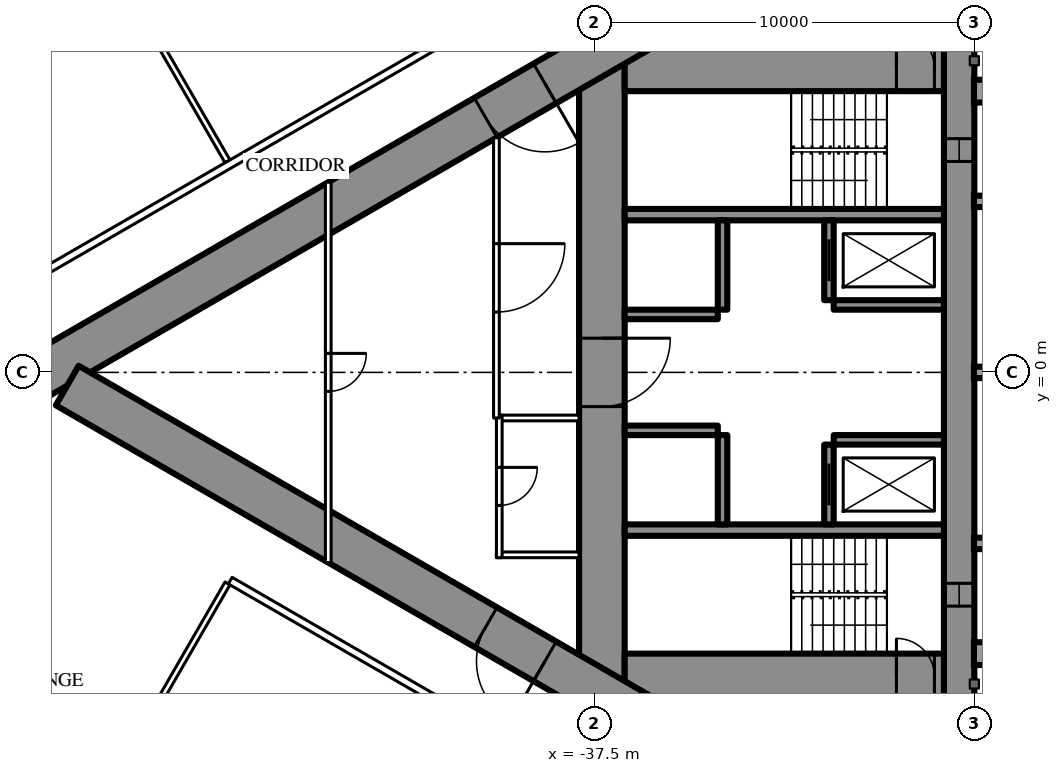
"""IFC4 building model, lengths in metres.
Left out: names, types, materials, properties, quantities, classifications, styles, units other than length and angle.
Written with IfcOpenShell. Run it as: python <this file> out.ifc"""

import sys

from ifc_helpers import new_model, si_unit, direction, frame, frame_2d, origin, place, context, subcontext, project, spatial, rectangle, extrude, element, fill, save


model = new_model("IFC4")
c1 = context("Model", 3, precision=1e-05, world=origin(), true_north=direction((0.0, 1.0)))
c2 = subcontext(c1, "Body", "Model", "MODEL_VIEW")
j1 = project(units=[si_unit("LENGTHUNIT", "METRE"), si_unit("PLANEANGLEUNIT", "RADIAN")], contexts=[c1])
p1 = place(None, origin())
s1 = spatial("IfcSite", under=j1, at=p1, CompositionType="ELEMENT")
p2 = place(p1, origin())
s2 = spatial("IfcBuilding", under=s1, at=p2, CompositionType="ELEMENT")
p3 = place(p2, frame((0.0, 0.0, 136.1)))
s3 = spatial("IfcBuildingStorey", under=s2, at=p3, CompositionType="ELEMENT", Elevation=136.1)
p4 = place(p3, frame((-27.9, 8.6, 0.0), z_axis=(0.0, 0.0, 1.0), x_axis=(0.0, -1.0, 0.0)))
e1 = element("IfcWall", 1, at=p4, inside=s3, PredefinedType="SHEAR", context=c2, shape_type="SweptSolid", body=[
    extrude(rectangle(XDim=17.2, YDim=0.8, at=frame_2d((8.6, 0.0))), origin(), (0.0, 0.0, 1.0), 3.5),
])
p5 = place(p4, frame((2.45, 0.0, 0.6)))
e2 = element("IfcOpeningElement", 2, at=p5, cuts=e1, PredefinedType="OPENING", context=c2, shape_type="SweptSolid", body=[
    extrude(rectangle(XDim=0.6, YDim=2.1, at=frame_2d((0.3, 1.05))), frame((0.0, 0.41, 0.0), z_axis=(0.0, -1.0, 0.0), x_axis=(1.0, 0.0, 0.0)), (0.0, 0.0, 1.0), 0.82),
])
p6 = place(p4, frame((14.15, 0.0, 0.6)))
e3 = element("IfcOpeningElement", 3, at=p6, cuts=e1, PredefinedType="OPENING", context=c2, shape_type="SweptSolid", body=[
    extrude(rectangle(XDim=0.6, YDim=2.1, at=frame_2d((0.3, 1.05))), frame((0.0, 0.41, 0.0), z_axis=(0.0, -1.0, 0.0), x_axis=(1.0, 0.0, 0.0)), (0.0, 0.0, 1.0), 0.82),
])
p7 = place(p3, frame((-37.3, 8.6, 0.0), z_axis=(0.0, 0.0, 1.0), x_axis=(0.0, -1.0, 0.0)))
e4 = element("IfcWall", 4, at=p7, inside=s3, PredefinedType="SHEAR", context=c2, shape_type="SweptSolid", body=[
    extrude(rectangle(XDim=17.2, YDim=1.2, at=frame_2d((8.6, 0.0))), origin(), (0.0, 0.0, 1.0), 3.5),
])
p8 = place(p7, frame((7.7, 0.0, 0.0)))
e5 = element("IfcOpeningElement", 5, at=p8, cuts=e4, PredefinedType="OPENING", context=c2, shape_type="SweptSolid", body=[
    extrude(rectangle(XDim=1.8, YDim=2.2, at=frame_2d((0.9, 1.1))), frame((0.0, 0.61, 0.0), z_axis=(0.0, -1.0, 0.0), x_axis=(1.0, 0.0, 0.0)), (0.0, 0.0, 1.0), 1.22),
])
p9 = place(p3, frame((-28.3, 8.0, 0.0), z_axis=(0.0, 0.0, 1.0), x_axis=(-1.0, 0.0, 0.0)))
e6 = element("IfcWall", 6, at=p9, inside=s3, PredefinedType="SHEAR", context=c2, shape_type="SweptSolid", body=[
    extrude(rectangle(XDim=8.4, YDim=1.2, at=frame_2d((4.2, 0.0))), origin(), (0.0, 0.0, 1.0), 3.5),
])
p10 = place(p9, frame((0.25, 0.0, 0.0)))
e7 = element("IfcOpeningElement", 7, at=p10, cuts=e6, PredefinedType="OPENING", context=c2, shape_type="SweptSolid", body=[
    extrude(rectangle(XDim=1.0, YDim=2.2, at=frame_2d((0.5, 1.1))), frame((0.0, 0.61, 0.0), z_axis=(0.0, -1.0, 0.0), x_axis=(1.0, 0.0, 0.0)), (0.0, 0.0, 1.0), 1.22),
])
p11 = place(p3, frame((-28.3, -8.0, 0.0), z_axis=(0.0, 0.0, 1.0), x_axis=(-1.0, 0.0, 0.0)))
e8 = element("IfcWall", 8, at=p11, inside=s3, PredefinedType="SHEAR", context=c2, shape_type="SweptSolid", body=[
    extrude(rectangle(XDim=8.4, YDim=1.2, at=frame_2d((4.2, 0.0))), origin(), (0.0, 0.0, 1.0), 3.5),
])
p12 = place(p11, frame((0.25, 0.0, 0.0)))
e9 = element("IfcOpeningElement", 9, at=p12, cuts=e8, PredefinedType="OPENING", context=c2, shape_type="SweptSolid", body=[
    extrude(rectangle(XDim=1.0, YDim=2.2, at=frame_2d((0.5, 1.1))), frame((0.0, 0.61, 0.0), z_axis=(0.0, -1.0, 0.0), x_axis=(1.0, 0.0, 0.0)), (0.0, 0.0, 1.0), 1.22),
])
for number, where, z_axis, x_axis in (
    (10, (-28.3, 4.15, 0.0), (0.0, 0.0, 1.0), (-1.0, 0.0, 0.0)),
    (11, (-28.3, -4.15, 0.0), (0.0, 0.0, 1.0), (-1.0, 0.0, 0.0)),
):
    element("IfcWall", number, at=place(p3, frame(where, z_axis=z_axis, x_axis=x_axis)), inside=s3, PredefinedType="SHEAR", context=c2, shape_type="SweptSolid", body=[
        extrude(rectangle(XDim=8.4, YDim=0.3, at=frame_2d((4.2, 0.0))), origin(), (0.0, 0.0, 1.0), 3.5),
    ])
p13 = place(p3, frame((-31.325, 4.0, 0.0), z_axis=(0.0, 0.0, 1.0), x_axis=(0.0, -1.0, 0.0)))
e12 = element("IfcWall", 12, at=p13, inside=s3, PredefinedType="SHEAR", context=c2, shape_type="SweptSolid", body=[
    extrude(rectangle(XDim=2.1, YDim=0.25, at=frame_2d((1.05, 0.0))), origin(), (0.0, 0.0, 1.0), 3.5),
])
p14 = place(p13, frame((0.5, 0.0, 0.0)))
e13 = element("IfcOpeningElement", 13, at=p14, cuts=e12, PredefinedType="OPENING", context=c2, shape_type="SweptSolid", body=[
    extrude(rectangle(XDim=1.1, YDim=2.2, at=frame_2d((0.55, 1.1))), frame((0.0, 0.135, 0.0), z_axis=(0.0, -1.0, 0.0), x_axis=(1.0, 0.0, 0.0)), (0.0, 0.0, 1.0), 0.27),
])
p15 = place(p3, frame((-34.125, 4.0, 0.0), z_axis=(0.0, 0.0, 1.0), x_axis=(0.0, -1.0, 0.0)))
e14 = element("IfcWall", 14, at=p15, inside=s3, PredefinedType="SHEAR", context=c2, shape_type="SweptSolid", body=[
    extrude(rectangle(XDim=2.35, YDim=0.25, at=frame_2d((1.175, 0.0))), origin(), (0.0, 0.0, 1.0), 3.5),
])
p16 = place(p3, frame((-28.3, 1.775, 0.0), z_axis=(0.0, 0.0, 1.0), x_axis=(-1.0, 0.0, 0.0)))
e15 = element("IfcWall", 15, at=p16, inside=s3, PredefinedType="SHEAR", context=c2, shape_type="SweptSolid", body=[
    extrude(rectangle(XDim=2.9, YDim=0.25, at=frame_2d((1.45, 0.0))), origin(), (0.0, 0.0, 1.0), 3.5),
])
p17 = place(p3, frame((-34.25, 1.525, 0.0), z_axis=(0.0, 0.0, 1.0), x_axis=(-1.0, 0.0, 0.0)))
e16 = element("IfcWall", 16, at=p17, inside=s3, PredefinedType="SHEAR", context=c2, shape_type="SweptSolid", body=[
    extrude(rectangle(XDim=2.45, YDim=0.25, at=frame_2d((1.225, 0.0))), origin(), (0.0, 0.0, 1.0), 3.5),
])
p18 = place(p3, frame((-31.325, -1.9, 0.0), z_axis=(0.0, 0.0, 1.0), x_axis=(0.0, -1.0, 0.0)))
e17 = element("IfcWall", 17, at=p18, inside=s3, PredefinedType="SHEAR", context=c2, shape_type="SweptSolid", body=[
    extrude(rectangle(XDim=2.1, YDim=0.25, at=frame_2d((1.05, 0.0))), origin(), (0.0, 0.0, 1.0), 3.5),
])
p19 = place(p18, frame((0.5, 0.0, 0.0)))
e18 = element("IfcOpeningElement", 18, at=p19, cuts=e17, PredefinedType="OPENING", context=c2, shape_type="SweptSolid", body=[
    extrude(rectangle(XDim=1.1, YDim=2.2, at=frame_2d((0.55, 1.1))), frame((0.0, 0.135, 0.0), z_axis=(0.0, -1.0, 0.0), x_axis=(1.0, 0.0, 0.0)), (0.0, 0.0, 1.0), 0.27),
])
p20 = place(p3, frame((-34.125, -1.65, 0.0), z_axis=(0.0, 0.0, 1.0), x_axis=(0.0, -1.0, 0.0)))
e19 = element("IfcWall", 19, at=p20, inside=s3, PredefinedType="SHEAR", context=c2, shape_type="SweptSolid", body=[
    extrude(rectangle(XDim=2.35, YDim=0.25, at=frame_2d((1.175, 0.0))), origin(), (0.0, 0.0, 1.0), 3.5),
])
p21 = place(p3, frame((-28.3, -1.775, 0.0), z_axis=(0.0, 0.0, 1.0), x_axis=(-1.0, 0.0, 0.0)))
e20 = element("IfcWall", 20, at=p21, inside=s3, PredefinedType="SHEAR", context=c2, shape_type="SweptSolid", body=[
    extrude(rectangle(XDim=2.9, YDim=0.25, at=frame_2d((1.45, 0.0))), origin(), (0.0, 0.0, 1.0), 3.5),
])
p22 = place(p3, frame((-34.25, -1.525, 0.0), z_axis=(0.0, 0.0, 1.0), x_axis=(-1.0, 0.0, 0.0)))
e21 = element("IfcWall", 21, at=p22, inside=s3, PredefinedType="SHEAR", context=c2, shape_type="SweptSolid", body=[
    extrude(rectangle(XDim=2.45, YDim=0.25, at=frame_2d((1.225, 0.0))), origin(), (0.0, 0.0, 1.0), 3.5),
])
p23 = place(p3, frame((-27.2, 14.3, 0.0), z_axis=(0.0, 0.0, 1.0), x_axis=(-0.866026593062, -0.499997940104, 0.0)))
e22 = element("IfcWall", 22, at=p23, inside=s3, PredefinedType="SHEAR", context=c2, shape_type="SweptSolid", body=[
    extrude(rectangle(XDim=28.946, YDim=1.2, at=frame_2d((14.473, 0.0))), origin(), (0.0, 0.0, 1.0), 3.5),
])
p24 = place(p23, frame((4.6, 0.0, 0.0)))
e23 = element("IfcOpeningElement", 23, at=p24, cuts=e22, PredefinedType="OPENING", context=c2, shape_type="SweptSolid", body=[
    extrude(rectangle(XDim=1.0, YDim=2.2, at=frame_2d((0.5, 1.1))), frame((0.0, 0.61, 0.0), z_axis=(0.0, -1.0, 0.0), x_axis=(1.0, 0.0, 0.0)), (0.0, 0.0, 1.0), 1.22),
])
p25 = place(p23, frame((13.395, 0.0, 0.0)))
e24 = element("IfcOpeningElement", 24, at=p25, cuts=e22, PredefinedType="OPENING", context=c2, shape_type="SweptSolid", body=[
    extrude(rectangle(XDim=1.8, YDim=2.2, at=frame_2d((0.9, 1.1))), frame((0.0, 0.61, 0.0), z_axis=(0.0, -1.0, 0.0), x_axis=(1.0, 0.0, 0.0)), (0.0, 0.0, 1.0), 1.22),
])
p26 = place(p3, frame((-27.2, -14.3, 0.0), z_axis=(0.0, 0.0, 1.0), x_axis=(-0.866024021859, 0.500002393557, 0.0)))
e25 = element("IfcWall", 25, at=p26, inside=s3, PredefinedType="SHEAR", context=c2, shape_type="SweptSolid", body=[
    extrude(rectangle(XDim=27.907, YDim=1.2, at=frame_2d((13.954, 0.0))), origin(), (0.0, 0.0, 1.0), 3.5),
])
p27 = place(p26, frame((4.6, 0.0, 0.0)))
e26 = element("IfcOpeningElement", 26, at=p27, cuts=e25, PredefinedType="OPENING", context=c2, shape_type="SweptSolid", body=[
    extrude(rectangle(XDim=1.0, YDim=2.2, at=frame_2d((0.5, 1.1))), frame((0.0, 0.61, 0.0), z_axis=(0.0, -1.0, 0.0), x_axis=(1.0, 0.0, 0.0)), (0.0, 0.0, 1.0), 1.22),
])
p28 = place(p26, frame((13.395, 0.0, 0.0)))
e27 = element("IfcOpeningElement", 27, at=p28, cuts=e25, PredefinedType="OPENING", context=c2, shape_type="SweptSolid", body=[
    extrude(rectangle(XDim=1.8, YDim=2.2, at=frame_2d((0.9, 1.1))), frame((0.0, 0.61, 0.0), z_axis=(0.0, -1.0, 0.0), x_axis=(1.0, 0.0, 0.0)), (0.0, 0.0, 1.0), 1.22),
])
for number, where, z_axis, x_axis in (
    (28, (-47.151, 5.552, 0.0), (0.0, 0.0, 1.0), (-0.5, 0.866, 0.0)),
    (29, (-47.151, -5.552, 0.0), (0.0, 0.0, 1.0), (-0.5, -0.866, 0.0)),
):
    element("IfcWall", number, at=place(p3, frame(where, z_axis=z_axis, x_axis=x_axis)), inside=s3, PredefinedType="PARTITIONING", context=c2, shape_type="SweptSolid", body=[
        extrude(rectangle(XDim=8.311, YDim=0.15, at=frame_2d((4.156, 0.0))), origin(), (0.0, 0.0, 1.0), 2.2),
    ])
p29 = place(p3, frame((-37.7, 10.894, 0.0), z_axis=(0.0, 0.0, 1.0), x_axis=(-0.866027905338, -0.499995667157, 0.0)))
e30 = element("IfcWall", 30, at=p29, inside=s3, PredefinedType="PARTITIONING", context=c2, shape_type="SweptSolid", body=[
    extrude(rectangle(XDim=21.787, YDim=0.2, at=frame_2d((10.894, 0.0))), origin(), (0.0, 0.0, 1.0), 3.25),
])
p30 = place(p29, frame((17.711, 0.0, 0.0)))
e31 = element("IfcOpeningElement", 31, at=p30, cuts=e30, PredefinedType="OPENING", context=c2, shape_type="SweptSolid", body=[
    extrude(rectangle(XDim=0.95, YDim=2.2, at=frame_2d((0.475, 1.1))), frame((0.0, 0.11, 0.0), z_axis=(0.0, -1.0, 0.0), x_axis=(1.0, 0.0, 0.0)), (0.0, 0.0, 1.0), 0.22),
])
p31 = place(p29, frame((19.399, 0.0, 0.0)))
e32 = element("IfcOpeningElement", 32, at=p31, cuts=e30, PredefinedType="OPENING", context=c2, shape_type="SweptSolid", body=[
    extrude(rectangle(XDim=1.8, YDim=2.2, at=frame_2d((0.9, 1.1))), frame((0.0, 0.11, 0.0), z_axis=(0.0, -1.0, 0.0), x_axis=(1.0, 0.0, 0.0)), (0.0, 0.0, 1.0), 0.22),
])
p32 = place(p29, frame((0.6, 0.0, 0.0)))
e33 = element("IfcOpeningElement", 33, at=p32, cuts=e30, PredefinedType="OPENING", context=c2, shape_type="SweptSolid", body=[
    extrude(rectangle(XDim=0.95, YDim=2.2, at=frame_2d((0.475, 1.1))), frame((0.0, 0.11, 0.0), z_axis=(0.0, -1.0, 0.0), x_axis=(1.0, 0.0, 0.0)), (0.0, 0.0, 1.0), 0.22),
])
p33 = place(p3, frame((-36.92, -11.344, 0.0), z_axis=(0.0, 0.0, 1.0), x_axis=(-0.866027897759, 0.499995680284, 0.0)))
e34 = element("IfcWall", 34, at=p33, inside=s3, PredefinedType="PARTITIONING", context=c2, shape_type="SweptSolid", body=[
    extrude(rectangle(XDim=11.731, YDim=0.2, at=frame_2d((5.865, 0.0))), origin(), (0.0, 0.0, 1.0), 3.25),
])
p34 = place(p33, frame((3.35, 0.0, 0.0)))
e35 = element("IfcOpeningElement", 35, at=p34, cuts=e34, PredefinedType="OPENING", context=c2, shape_type="SweptSolid", body=[
    extrude(rectangle(XDim=1.0, YDim=2.2, at=frame_2d((0.5, 1.1))), frame((0.0, 0.11, 0.0), z_axis=(0.0, -1.0, 0.0), x_axis=(1.0, 0.0, 0.0)), (0.0, 0.0, 1.0), 0.22),
])
for number, where, z_axis, x_axis in (
    (36, (-37.9, -1.2, 0.0), (0.0, 0.0, 1.0), (-1.0, 0.0, 0.0)),
    (37, (-37.9, -4.8, 0.0), (0.0, 0.0, 1.0), (-1.0, 0.0, 0.0)),
):
    element("IfcWall", number, at=place(p3, frame(where, z_axis=z_axis, x_axis=x_axis)), inside=s3, PredefinedType="PARTITIONING", context=c2, shape_type="SweptSolid", body=[
        extrude(rectangle(XDim=2.175, YDim=0.15, at=frame_2d((1.087, 0.0))), origin(), (0.0, 0.0, 1.0), 3.25),
    ])
p35 = place(p3, frame((-40.0, -1.125, 0.0), z_axis=(0.0, 0.0, 1.0), x_axis=(0.0, -1.0, 0.0)))
e38 = element("IfcWall", 38, at=p35, inside=s3, PredefinedType="PARTITIONING", context=c2, shape_type="SweptSolid", body=[
    extrude(rectangle(XDim=3.75, YDim=0.15, at=frame_2d((1.875, 0.0))), origin(), (0.0, 0.0, 1.0), 3.25),
])
p36 = place(p35, frame((1.375, 0.0, 0.0)))
e39 = element("IfcOpeningElement", 39, at=p36, cuts=e38, PredefinedType="OPENING", context=c2, shape_type="SweptSolid", body=[
    extrude(rectangle(XDim=1.0, YDim=2.2, at=frame_2d((0.5, 1.1))), frame((0.0, 0.085, 0.0), z_axis=(0.0, -1.0, 0.0), x_axis=(1.0, 0.0, 0.0)), (0.0, 0.0, 1.0), 0.17),
])
p37 = place(p3, frame((-40.075, 6.174, 0.0), z_axis=(0.0, 0.0, 1.0), x_axis=(0.0, -1.0, 0.0)))
e40 = element("IfcWall", 40, at=p37, inside=s3, PredefinedType="PARTITIONING", context=c2, shape_type="SweptSolid", body=[
    extrude(rectangle(XDim=7.374, YDim=0.15, at=frame_2d((3.687, 0.0))), origin(), (0.0, 0.0, 1.0), 3.25),
])
p38 = place(p37, frame((2.787, 0.0, 0.0)))
e41 = element("IfcOpeningElement", 41, at=p38, cuts=e40, PredefinedType="OPENING", context=c2, shape_type="SweptSolid", body=[
    extrude(rectangle(XDim=1.8, YDim=2.2, at=frame_2d((0.9, 1.1))), frame((0.0, 0.085, 0.0), z_axis=(0.0, -1.0, 0.0), x_axis=(1.0, 0.0, 0.0)), (0.0, 0.0, 1.0), 0.17),
])
p39 = place(p3, frame((-44.5, 5.005, 0.0), z_axis=(0.0, 0.0, 1.0), x_axis=(0.0, -1.0, 0.0)))
e42 = element("IfcWall", 42, at=p39, inside=s3, PredefinedType="PARTITIONING", context=c2, shape_type="SweptSolid", body=[
    extrude(rectangle(XDim=10.009, YDim=0.15, at=frame_2d((5.005, 0.0))), origin(), (0.0, 0.0, 1.0), 2.45),
])
p40 = place(p39, frame((4.505, 0.0, 0.0)))
e43 = element("IfcOpeningElement", 43, at=p40, cuts=e42, PredefinedType="OPENING", context=c2, shape_type="SweptSolid", body=[
    extrude(rectangle(XDim=1.0, YDim=2.2, at=frame_2d((0.5, 1.1))), frame((0.0, 0.085, 0.0), z_axis=(0.0, -1.0, 0.0), x_axis=(1.0, 0.0, 0.0)), (0.0, 0.0, 1.0), 0.17),
])
p41 = place(p36, origin())
e44 = element("IfcDoor", 44, at=p41, inside=s3, OperationType="SINGLE_SWING_LEFT", PredefinedType="DOOR", context=c2, shape_type="SweptSolid", body=[
    extrude(rectangle(XDim=1.0, YDim=2.2, at=frame_2d((0.5, 1.1))), frame((0.0, 0.025, 0.0), z_axis=(0.0, -1.0, 0.0), x_axis=(1.0, 0.0, 0.0)), (0.0, 0.0, 1.0), 0.05),
])
fill(e39, e44)
p42 = place(p38, origin())
e45 = element("IfcDoor", 45, at=p42, inside=s3, OperationType="DOUBLE_DOOR_SINGLE_SWING", PredefinedType="DOOR", context=c2, shape_type="SweptSolid", body=[
    extrude(rectangle(XDim=1.8, YDim=2.2, at=frame_2d((0.9, 1.1))), frame((0.0, 0.025, 0.0), z_axis=(0.0, -1.0, 0.0), x_axis=(1.0, 0.0, 0.0)), (0.0, 0.0, 1.0), 0.05),
])
fill(e41, e45)
p43 = place(p40, origin())
e46 = element("IfcDoor", 46, at=p43, inside=s3, OperationType="SINGLE_SWING_LEFT", PredefinedType="DOOR", context=c2, shape_type="SweptSolid", body=[
    extrude(rectangle(XDim=1.0, YDim=2.2, at=frame_2d((0.5, 1.1))), frame((0.0, 0.025, 0.0), z_axis=(0.0, -1.0, 0.0), x_axis=(1.0, 0.0, 0.0)), (0.0, 0.0, 1.0), 0.05),
])
fill(e43, e46)
p44 = place(p25, origin())
e47 = element("IfcDoor", 47, at=p44, inside=s3, OperationType="DOUBLE_DOOR_SINGLE_SWING", PredefinedType="DOOR", context=c2, shape_type="SweptSolid", body=[
    extrude(rectangle(XDim=1.8, YDim=2.2, at=frame_2d((0.9, 1.1))), frame((0.0, 0.025, 0.0), z_axis=(0.0, -1.0, 0.0), x_axis=(1.0, 0.0, 0.0)), (0.0, 0.0, 1.0), 0.05),
])
fill(e24, e47)
p45 = place(p28, origin())
e48 = element("IfcDoor", 48, at=p45, inside=s3, OperationType="DOUBLE_DOOR_SINGLE_SWING", PredefinedType="DOOR", context=c2, shape_type="SweptSolid", body=[
    extrude(rectangle(XDim=1.8, YDim=2.2, at=frame_2d((0.9, 1.1))), frame((0.0, 0.025, 0.0), z_axis=(0.0, -1.0, 0.0), x_axis=(1.0, 0.0, 0.0)), (0.0, 0.0, 1.0), 0.05),
])
fill(e27, e48)
p46 = place(p8, origin())
e49 = element("IfcDoor", 49, at=p46, inside=s3, OperationType="DOUBLE_DOOR_SINGLE_SWING", PredefinedType="DOOR", context=c2, shape_type="SweptSolid", body=[
    extrude(rectangle(XDim=1.8, YDim=2.2, at=frame_2d((0.9, 1.1))), frame((0.0, 0.025, 0.0), z_axis=(0.0, -1.0, 0.0), x_axis=(1.0, 0.0, 0.0)), (0.0, 0.0, 1.0), 0.05),
])
fill(e5, e49)
p47 = place(p10, origin())
e50 = element("IfcDoor", 50, at=p47, inside=s3, OperationType="SINGLE_SWING_RIGHT", PredefinedType="DOOR", context=c2, shape_type="SweptSolid", body=[
    extrude(rectangle(XDim=1.0, YDim=2.2, at=frame_2d((0.5, 1.1))), frame((0.0, 0.025, 0.0), z_axis=(0.0, -1.0, 0.0), x_axis=(1.0, 0.0, 0.0)), (0.0, 0.0, 1.0), 0.05),
])
fill(e7, e50)
p48 = place(p12, origin())
e51 = element("IfcDoor", 51, at=p48, inside=s3, OperationType="SINGLE_SWING_RIGHT", PredefinedType="DOOR", context=c2, shape_type="SweptSolid", body=[
    extrude(rectangle(XDim=1.0, YDim=2.2, at=frame_2d((0.5, 1.1))), frame((0.0, 0.025, 0.0), z_axis=(0.0, -1.0, 0.0), x_axis=(1.0, 0.0, 0.0)), (0.0, 0.0, 1.0), 0.05),
])
fill(e9, e51)
p49 = place(p14, origin())
e52 = element("IfcDoor", 52, at=p49, inside=s3, OperationType="SLIDING_TO_LEFT", PredefinedType="USERDEFINED", context=c2, shape_type="SweptSolid", body=[
    extrude(rectangle(XDim=1.1, YDim=2.2, at=frame_2d((0.55, 1.1))), frame((0.0, 0.025, 0.0), z_axis=(0.0, -1.0, 0.0), x_axis=(1.0, 0.0, 0.0)), (0.0, 0.0, 1.0), 0.05),
])
fill(e13, e52)
p50 = place(p19, origin())
e53 = element("IfcDoor", 53, at=p50, inside=s3, OperationType="SLIDING_TO_LEFT", PredefinedType="USERDEFINED", context=c2, shape_type="SweptSolid", body=[
    extrude(rectangle(XDim=1.1, YDim=2.2, at=frame_2d((0.55, 1.1))), frame((0.0, 0.025, 0.0), z_axis=(0.0, -1.0, 0.0), x_axis=(1.0, 0.0, 0.0)), (0.0, 0.0, 1.0), 0.05),
])
fill(e18, e53)
p51 = place(p5, origin())
e54 = element("IfcWindow", 54, at=p51, inside=s3, PartitioningType="SINGLE_PANEL", PredefinedType="WINDOW", context=c2, shape_type="SweptSolid", body=[
    extrude(rectangle(XDim=0.6, YDim=2.1, at=frame_2d((0.3, 1.05))), frame((0.0, 0.03, 0.0), z_axis=(0.0, -1.0, 0.0), x_axis=(1.0, 0.0, 0.0)), (0.0, 0.0, 1.0), 0.06),
])
fill(e2, e54)
p52 = place(p6, origin())
e55 = element("IfcWindow", 55, at=p52, inside=s3, PartitioningType="SINGLE_PANEL", PredefinedType="WINDOW", context=c2, shape_type="SweptSolid", body=[
    extrude(rectangle(XDim=0.6, YDim=2.1, at=frame_2d((0.3, 1.05))), frame((0.0, 0.03, 0.0), z_axis=(0.0, -1.0, 0.0), x_axis=(1.0, 0.0, 0.0)), (0.0, 0.0, 1.0), 0.06),
])
fill(e3, e55)
save(model, sys.argv[1])
